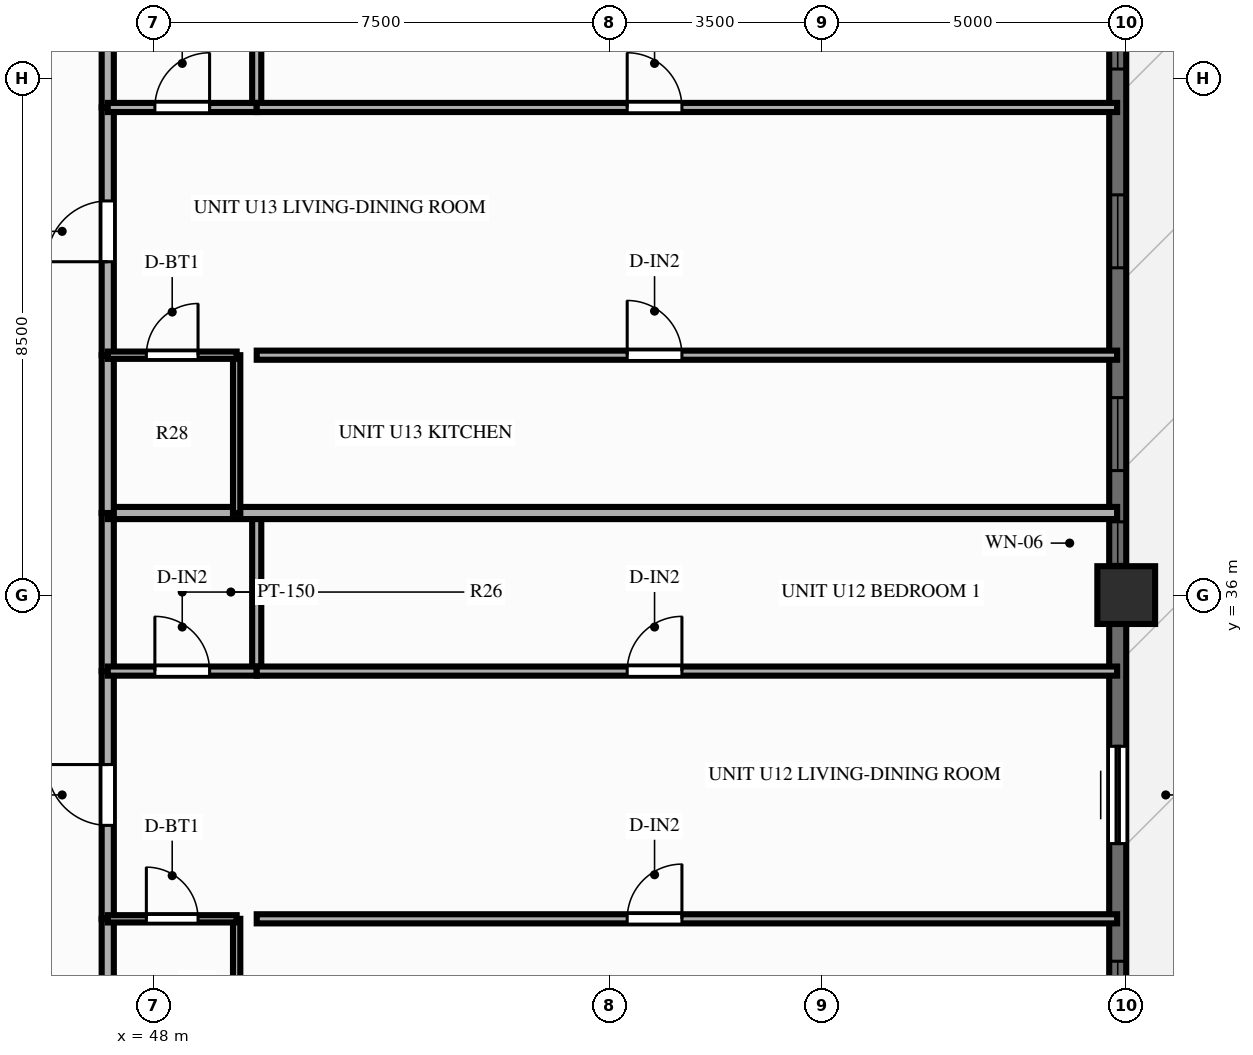
"""IFC4 building model, lengths in metres.
Left out: names, types, materials, properties, quantities, classifications, styles, units other than length and angle.
Written with IfcOpenShell. Run it as: python <this file> out.ifc"""

import sys

from ifc_helpers import new_model, si_unit, direction, frame, frame_2d, origin, origin_2d, place, context, subcontext, project, spatial, rectangle, extrude, source, transform, mapped, element, fill, save


model = new_model("IFC4")
c1 = context("Model", 3, precision=1e-05, world=origin(), true_north=direction((0.0, 1.0)))
c2 = subcontext(c1, "Body", "Model", "MODEL_VIEW")
j1 = project(units=[si_unit("LENGTHUNIT", "METRE"), si_unit("PLANEANGLEUNIT", "RADIAN")], contexts=[c1])
p1 = place(None, origin())
s1 = spatial("IfcSite", under=j1, at=p1, CompositionType="ELEMENT")
p2 = place(p1, origin())
s2 = spatial("IfcBuilding", under=s1, at=p2, CompositionType="ELEMENT")
p3 = place(p2, frame((0.0, 0.0, 110.85)))
s3 = spatial("IfcBuildingStorey", under=s2, at=p3, CompositionType="ELEMENT", Elevation=110.85)
m1 = source(origin(), c2, "Body", "SweptSolid", [
    extrude(rectangle(XDim=0.95, YDim=0.95, at=origin_2d()), origin(), (0.0, 0.0, 1.0), 3.0),
])
p4 = place(p3, frame((64.0, 36.0, 0.0), z_axis=(0.0, 0.0, 1.0), x_axis=(1.0, 0.0, 0.0)))
e1 = element("IfcColumn", 1, at=p4, inside=s3, PredefinedType="COLUMN", context=c2, shape_type="MappedRepresentation", body=[
    mapped(m1, transform((0.0, 0.0, 0.0), scale=1.0)),
])
p5 = place(p3, frame((63.86, 7.2, 0.0), z_axis=(0.0, 0.0, 1.0), x_axis=(0.0, 1.0, 0.0)))
e2 = element("IfcWall", 2, at=p5, inside=s3, PredefinedType="SOLIDWALL", context=c2, shape_type="SweptSolid", body=[
    extrude(rectangle(XDim=39.6, YDim=0.28, at=frame_2d((19.8, 0.0))), origin(), (0.0, 0.0, 1.0), 2.28),
])
p6 = place(p5, frame((0.945, 0.0, 0.25)))
e3 = element("IfcOpeningElement", 3, at=p6, cuts=e2, PredefinedType="OPENING", context=c2, shape_type="SweptSolid", body=[
    extrude(rectangle(XDim=1.2, YDim=1.5, at=frame_2d((0.6, 0.75))), frame((0.0, 0.152, 0.0), z_axis=(0.0, -1.0, 0.0), x_axis=(1.0, 0.0, 0.0)), (0.0, 0.0, 1.0), 0.304),
])
p7 = place(p5, frame((4.213, 0.0, 0.25)))
e4 = element("IfcOpeningElement", 4, at=p7, cuts=e2, PredefinedType="OPENING", context=c2, shape_type="SweptSolid", body=[
    extrude(rectangle(XDim=1.2, YDim=1.5, at=frame_2d((0.6, 0.75))), frame((0.0, 0.152, 0.0), z_axis=(0.0, -1.0, 0.0), x_axis=(1.0, 0.0, 0.0)), (0.0, 0.0, 1.0), 0.304),
])
p8 = place(p5, frame((7.55, 0.0, 0.25)))
e5 = element("IfcOpeningElement", 5, at=p8, cuts=e2, PredefinedType="OPENING", context=c2, shape_type="SweptSolid", body=[
    extrude(rectangle(XDim=1.2, YDim=1.5, at=frame_2d((0.6, 0.75))), frame((0.0, 0.152, 0.0), z_axis=(0.0, -1.0, 0.0), x_axis=(1.0, 0.0, 0.0)), (0.0, 0.0, 1.0), 0.304),
])
p9 = place(p5, frame((13.483, 0.0, 0.25)))
e6 = element("IfcOpeningElement", 6, at=p9, cuts=e2, PredefinedType="OPENING", context=c2, shape_type="SweptSolid", body=[
    extrude(rectangle(XDim=1.2, YDim=1.5, at=frame_2d((0.6, 0.75))), frame((0.0, 0.152, 0.0), z_axis=(0.0, -1.0, 0.0), x_axis=(1.0, 0.0, 0.0)), (0.0, 0.0, 1.0), 0.304),
])
p10 = place(p5, frame((16.82, 0.0, 0.25)))
e7 = element("IfcOpeningElement", 7, at=p10, cuts=e2, PredefinedType="OPENING", context=c2, shape_type="SweptSolid", body=[
    extrude(rectangle(XDim=1.2, YDim=1.5, at=frame_2d((0.6, 0.75))), frame((0.0, 0.152, 0.0), z_axis=(0.0, -1.0, 0.0), x_axis=(1.0, 0.0, 0.0)), (0.0, 0.0, 1.0), 0.304),
])
p11 = place(p5, frame((19.2, 0.0, 0.25)))
e8 = element("IfcOpeningElement", 8, at=p11, cuts=e2, PredefinedType="OPENING", context=c2, shape_type="SweptSolid", body=[
    extrude(rectangle(XDim=1.2, YDim=1.5, at=frame_2d((0.6, 0.75))), frame((0.0, 0.152, 0.0), z_axis=(0.0, -1.0, 0.0), x_axis=(1.0, 0.0, 0.0)), (0.0, 0.0, 1.0), 0.304),
])
p12 = place(p5, frame((21.578, 0.0, 0.25)))
e9 = element("IfcOpeningElement", 9, at=p12, cuts=e2, PredefinedType="OPENING", context=c2, shape_type="SweptSolid", body=[
    extrude(rectangle(XDim=1.2, YDim=1.5, at=frame_2d((0.6, 0.75))), frame((0.0, 0.152, 0.0), z_axis=(0.0, -1.0, 0.0), x_axis=(1.0, 0.0, 0.0)), (0.0, 0.0, 1.0), 0.304),
])
p13 = place(p5, frame((26.313, 0.0, 0.0), z_axis=(0.0, 0.0, 1.0), x_axis=(-1.0, 0.0, 0.0)))
e10 = element("IfcOpeningElement", 10, at=p13, cuts=e2, PredefinedType="OPENING", context=c2, shape_type="SweptSolid", body=[
    extrude(rectangle(XDim=1.6, YDim=2.15, at=frame_2d((0.8, 1.075))), frame((0.0, 0.152, 0.0), z_axis=(0.0, -1.0, 0.0), x_axis=(1.0, 0.0, 0.0)), (0.0, 0.0, 1.0), 0.304),
])
p14 = place(p5, frame((29.305, 0.0, 0.25)))
e11 = element("IfcOpeningElement", 11, at=p14, cuts=e2, PredefinedType="OPENING", context=c2, shape_type="SweptSolid", body=[
    extrude(rectangle(XDim=0.7, YDim=1.5, at=frame_2d((0.35, 0.75))), frame((0.0, 0.152, 0.0), z_axis=(0.0, -1.0, 0.0), x_axis=(1.0, 0.0, 0.0)), (0.0, 0.0, 1.0), 0.304),
])
p15 = place(p5, frame((30.848, 0.0, 0.25)))
e12 = element("IfcOpeningElement", 12, at=p15, cuts=e2, PredefinedType="OPENING", context=c2, shape_type="SweptSolid", body=[
    extrude(rectangle(XDim=1.2, YDim=1.5, at=frame_2d((0.6, 0.75))), frame((0.0, 0.152, 0.0), z_axis=(0.0, -1.0, 0.0), x_axis=(1.0, 0.0, 0.0)), (0.0, 0.0, 1.0), 0.304),
])
p16 = place(p5, frame((34.183, 0.0, 0.25)))
e13 = element("IfcOpeningElement", 13, at=p16, cuts=e2, PredefinedType="OPENING", context=c2, shape_type="SweptSolid", body=[
    extrude(rectangle(XDim=1.2, YDim=1.5, at=frame_2d((0.6, 0.75))), frame((0.0, 0.152, 0.0), z_axis=(0.0, -1.0, 0.0), x_axis=(1.0, 0.0, 0.0)), (0.0, 0.0, 1.0), 0.304),
])
p17 = place(p5, frame((37.452, 0.0, 0.25)))
e14 = element("IfcOpeningElement", 14, at=p17, cuts=e2, PredefinedType="OPENING", context=c2, shape_type="SweptSolid", body=[
    extrude(rectangle(XDim=1.2, YDim=1.5, at=frame_2d((0.6, 0.75))), frame((0.0, 0.152, 0.0), z_axis=(0.0, -1.0, 0.0), x_axis=(1.0, 0.0, 0.0)), (0.0, 0.0, 1.0), 0.304),
])
p18 = place(p3, frame((47.25, 28.08, 0.0), z_axis=(0.0, 0.0, 1.0), x_axis=(0.0, 1.0, 0.0)))
e15 = element("IfcWall", 15, at=p18, inside=s3, PredefinedType="PARTITIONING", context=c2, shape_type="SweptSolid", body=[
    extrude(rectangle(XDim=2.595, YDim=0.2, at=frame_2d((1.298, 0.0))), origin(), (0.0, 0.0, 1.0), 2.79),
])
p19 = place(p3, frame((47.25, 30.676, 0.0), z_axis=(0.0, 0.0, 1.0), x_axis=(0.0, 1.0, 0.0)))
e16 = element("IfcWall", 16, at=p19, inside=s3, PredefinedType="PARTITIONING", context=c2, shape_type="SweptSolid", body=[
    extrude(rectangle(XDim=4.074, YDim=0.2, at=frame_2d((2.037, 0.0))), origin(), (0.0, 0.0, 1.0), 2.79),
])
p20 = place(p19, frame((1.537, 0.0, 0.0)))
e17 = element("IfcOpeningElement", 17, at=p20, cuts=e16, PredefinedType="OPENING", context=c2, shape_type="SweptSolid", body=[
    extrude(rectangle(XDim=1.0, YDim=2.15, at=frame_2d((0.5, 1.075))), frame((0.0, 0.112, 0.0), z_axis=(0.0, -1.0, 0.0), x_axis=(1.0, 0.0, 0.0)), (0.0, 0.0, 1.0), 0.224),
])
p21 = place(p3, frame((47.25, 34.75, 0.0), z_axis=(0.0, 0.0, 1.0), x_axis=(0.0, 1.0, 0.0)))
e18 = element("IfcWall", 18, at=p21, inside=s3, PredefinedType="PARTITIONING", context=c2, shape_type="SweptSolid", body=[
    extrude(rectangle(XDim=2.6, YDim=0.2, at=frame_2d((1.3, 0.0))), origin(), (0.0, 0.0, 1.0), 2.79),
])
p22 = place(p3, frame((49.37, 28.08, 0.0), z_axis=(0.0, 0.0, 1.0), x_axis=(0.0, 1.0, 0.0)))
e19 = element("IfcWall", 19, at=p22, inside=s3, PredefinedType="PARTITIONING", context=c2, shape_type="SweptSolid", body=[
    extrude(rectangle(XDim=2.595, YDim=0.12, at=frame_2d((1.298, 0.0))), origin(), (0.0, 0.0, 1.0), 2.79),
])
p23 = place(p3, frame((49.7, 34.75, 0.0), z_axis=(0.0, 0.0, 1.0), x_axis=(0.0, 1.0, 0.0)))
e20 = element("IfcWall", 20, at=p23, inside=s3, PredefinedType="PARTITIONING", context=c2, shape_type="SweptSolid", body=[
    extrude(rectangle(XDim=2.6, YDim=0.15, at=frame_2d((1.3, 0.0))), origin(), (0.0, 0.0, 1.0), 2.79),
])
p24 = place(p3, frame((47.25, 30.676, 0.0), z_axis=(0.0, 0.0, 1.0), x_axis=(1.0, 0.0, 0.0)))
e21 = element("IfcWall", 21, at=p24, inside=s3, PredefinedType="PARTITIONING", context=c2, shape_type="SweptSolid", body=[
    extrude(rectangle(XDim=2.12, YDim=0.12, at=frame_2d((1.06, 0.0))), origin(), (0.0, 0.0, 1.0), 2.79),
])
p25 = place(p24, frame((0.635, 0.0, 0.0)))
e22 = element("IfcOpeningElement", 22, at=p25, cuts=e21, PredefinedType="OPENING", context=c2, shape_type="SweptSolid", body=[
    extrude(rectangle(XDim=0.85, YDim=2.05, at=frame_2d((0.425, 1.025))), frame((0.0, 0.072, 0.0), z_axis=(0.0, -1.0, 0.0), x_axis=(1.0, 0.0, 0.0)), (0.0, 0.0, 1.0), 0.144),
])
p26 = place(p3, frame((49.7, 30.676, 0.0), z_axis=(0.0, 0.0, 1.0), x_axis=(1.0, 0.0, 0.0)))
e23 = element("IfcWall", 23, at=p26, inside=s3, PredefinedType="PARTITIONING", context=c2, shape_type="SweptSolid", body=[
    extrude(rectangle(XDim=14.15, YDim=0.15, at=frame_2d((7.075, 0.0))), origin(), (0.0, 0.0, 1.0), 2.79),
])
p27 = place(p26, frame((6.093, 0.0, 0.0)))
e24 = element("IfcOpeningElement", 24, at=p27, cuts=e23, PredefinedType="OPENING", context=c2, shape_type="SweptSolid", body=[
    extrude(rectangle(XDim=0.9, YDim=2.1, at=frame_2d((0.45, 1.05))), frame((0.0, 0.087, 0.0), z_axis=(0.0, -1.0, 0.0), x_axis=(1.0, 0.0, 0.0)), (0.0, 0.0, 1.0), 0.174),
])
p28 = place(p3, frame((47.25, 34.75, 0.0), z_axis=(0.0, 0.0, 1.0), x_axis=(1.0, 0.0, 0.0)))
e25 = element("IfcWall", 25, at=p28, inside=s3, PredefinedType="PARTITIONING", context=c2, shape_type="SweptSolid", body=[
    extrude(rectangle(XDim=2.45, YDim=0.15, at=frame_2d((1.225, 0.0))), origin(), (0.0, 0.0, 1.0), 2.79),
])
p29 = place(p28, frame((0.775, 0.0, 0.0)))
e26 = element("IfcOpeningElement", 26, at=p29, cuts=e25, PredefinedType="OPENING", context=c2, shape_type="SweptSolid", body=[
    extrude(rectangle(XDim=0.9, YDim=2.1, at=frame_2d((0.45, 1.05))), frame((0.0, 0.087, 0.0), z_axis=(0.0, -1.0, 0.0), x_axis=(1.0, 0.0, 0.0)), (0.0, 0.0, 1.0), 0.174),
])
p30 = place(p3, frame((49.7, 34.75, 0.0), z_axis=(0.0, 0.0, 1.0), x_axis=(1.0, 0.0, 0.0)))
e27 = element("IfcWall", 27, at=p30, inside=s3, PredefinedType="PARTITIONING", context=c2, shape_type="SweptSolid", body=[
    extrude(rectangle(XDim=14.15, YDim=0.15, at=frame_2d((7.075, 0.0))), origin(), (0.0, 0.0, 1.0), 2.79),
])
p31 = place(p30, frame((6.093, 0.0, 0.0)))
e28 = element("IfcOpeningElement", 28, at=p31, cuts=e27, PredefinedType="OPENING", context=c2, shape_type="SweptSolid", body=[
    extrude(rectangle(XDim=0.9, YDim=2.1, at=frame_2d((0.45, 1.05))), frame((0.0, 0.087, 0.0), z_axis=(0.0, -1.0, 0.0), x_axis=(1.0, 0.0, 0.0)), (0.0, 0.0, 1.0), 0.174),
])
p32 = place(p3, frame((47.25, 37.35, 0.0), z_axis=(0.0, 0.0, 1.0), x_axis=(1.0, 0.0, 0.0)))
e29 = element("IfcWall", 29, at=p32, inside=s3, PredefinedType="PARTITIONING", context=c2, shape_type="SweptSolid", body=[
    extrude(rectangle(XDim=16.6, YDim=0.2, at=frame_2d((8.3, 0.0))), origin(), (0.0, 0.0, 1.0), 2.79),
])
p33 = place(p3, frame((47.25, 37.35, 0.0), z_axis=(0.0, 0.0, 1.0), x_axis=(0.0, 1.0, 0.0)))
e30 = element("IfcWall", 30, at=p33, inside=s3, PredefinedType="PARTITIONING", context=c2, shape_type="SweptSolid", body=[
    extrude(rectangle(XDim=2.595, YDim=0.2, at=frame_2d((1.298, 0.0))), origin(), (0.0, 0.0, 1.0), 2.79),
])
p34 = place(p3, frame((47.25, 39.946, 0.0), z_axis=(0.0, 0.0, 1.0), x_axis=(0.0, 1.0, 0.0)))
e31 = element("IfcWall", 31, at=p34, inside=s3, PredefinedType="PARTITIONING", context=c2, shape_type="SweptSolid", body=[
    extrude(rectangle(XDim=4.074, YDim=0.2, at=frame_2d((2.037, 0.0))), origin(), (0.0, 0.0, 1.0), 2.79),
])
p35 = place(p34, frame((1.537, 0.0, 0.0)))
e32 = element("IfcOpeningElement", 32, at=p35, cuts=e31, PredefinedType="OPENING", context=c2, shape_type="SweptSolid", body=[
    extrude(rectangle(XDim=1.0, YDim=2.15, at=frame_2d((0.5, 1.075))), frame((0.0, 0.112, 0.0), z_axis=(0.0, -1.0, 0.0), x_axis=(1.0, 0.0, 0.0)), (0.0, 0.0, 1.0), 0.224),
])
p36 = place(p3, frame((47.25, 44.02, 0.0), z_axis=(0.0, 0.0, 1.0), x_axis=(0.0, 1.0, 0.0)))
e33 = element("IfcWall", 33, at=p36, inside=s3, PredefinedType="PARTITIONING", context=c2, shape_type="SweptSolid", body=[
    extrude(rectangle(XDim=2.6, YDim=0.2, at=frame_2d((1.3, 0.0))), origin(), (0.0, 0.0, 1.0), 2.79),
])
p37 = place(p3, frame((49.37, 37.35, 0.0), z_axis=(0.0, 0.0, 1.0), x_axis=(0.0, 1.0, 0.0)))
e34 = element("IfcWall", 34, at=p37, inside=s3, PredefinedType="PARTITIONING", context=c2, shape_type="SweptSolid", body=[
    extrude(rectangle(XDim=2.595, YDim=0.12, at=frame_2d((1.298, 0.0))), origin(), (0.0, 0.0, 1.0), 2.79),
])
p38 = place(p3, frame((49.7, 44.02, 0.0), z_axis=(0.0, 0.0, 1.0), x_axis=(0.0, 1.0, 0.0)))
e35 = element("IfcWall", 35, at=p38, inside=s3, PredefinedType="PARTITIONING", context=c2, shape_type="SweptSolid", body=[
    extrude(rectangle(XDim=2.6, YDim=0.15, at=frame_2d((1.3, 0.0))), origin(), (0.0, 0.0, 1.0), 2.79),
])
p39 = place(p3, frame((47.25, 39.946, 0.0), z_axis=(0.0, 0.0, 1.0), x_axis=(1.0, 0.0, 0.0)))
e36 = element("IfcWall", 36, at=p39, inside=s3, PredefinedType="PARTITIONING", context=c2, shape_type="SweptSolid", body=[
    extrude(rectangle(XDim=2.12, YDim=0.12, at=frame_2d((1.06, 0.0))), origin(), (0.0, 0.0, 1.0), 2.79),
])
p40 = place(p39, frame((0.635, 0.0, 0.0)))
e37 = element("IfcOpeningElement", 37, at=p40, cuts=e36, PredefinedType="OPENING", context=c2, shape_type="SweptSolid", body=[
    extrude(rectangle(XDim=0.85, YDim=2.05, at=frame_2d((0.425, 1.025))), frame((0.0, 0.072, 0.0), z_axis=(0.0, -1.0, 0.0), x_axis=(1.0, 0.0, 0.0)), (0.0, 0.0, 1.0), 0.144),
])
p41 = place(p3, frame((49.7, 39.946, 0.0), z_axis=(0.0, 0.0, 1.0), x_axis=(1.0, 0.0, 0.0)))
e38 = element("IfcWall", 38, at=p41, inside=s3, PredefinedType="PARTITIONING", context=c2, shape_type="SweptSolid", body=[
    extrude(rectangle(XDim=14.15, YDim=0.15, at=frame_2d((7.075, 0.0))), origin(), (0.0, 0.0, 1.0), 2.79),
])
p42 = place(p41, frame((6.093, 0.0, 0.0)))
e39 = element("IfcOpeningElement", 39, at=p42, cuts=e38, PredefinedType="OPENING", context=c2, shape_type="SweptSolid", body=[
    extrude(rectangle(XDim=0.9, YDim=2.1, at=frame_2d((0.45, 1.05))), frame((0.0, 0.087, 0.0), z_axis=(0.0, -1.0, 0.0), x_axis=(1.0, 0.0, 0.0)), (0.0, 0.0, 1.0), 0.174),
])
p43 = place(p3, frame((47.25, 44.02, 0.0), z_axis=(0.0, 0.0, 1.0), x_axis=(1.0, 0.0, 0.0)))
e40 = element("IfcWall", 40, at=p43, inside=s3, PredefinedType="PARTITIONING", context=c2, shape_type="SweptSolid", body=[
    extrude(rectangle(XDim=2.45, YDim=0.15, at=frame_2d((1.225, 0.0))), origin(), (0.0, 0.0, 1.0), 2.79),
])
p44 = place(p43, frame((0.775, 0.0, 0.0)))
e41 = element("IfcOpeningElement", 41, at=p44, cuts=e40, PredefinedType="OPENING", context=c2, shape_type="SweptSolid", body=[
    extrude(rectangle(XDim=0.9, YDim=2.1, at=frame_2d((0.45, 1.05))), frame((0.0, 0.087, 0.0), z_axis=(0.0, -1.0, 0.0), x_axis=(1.0, 0.0, 0.0)), (0.0, 0.0, 1.0), 0.174),
])
p45 = place(p3, frame((49.7, 44.02, 0.0), z_axis=(0.0, 0.0, 1.0), x_axis=(1.0, 0.0, 0.0)))
e42 = element("IfcWall", 42, at=p45, inside=s3, PredefinedType="PARTITIONING", context=c2, shape_type="SweptSolid", body=[
    extrude(rectangle(XDim=14.15, YDim=0.15, at=frame_2d((7.075, 0.0))), origin(), (0.0, 0.0, 1.0), 2.79),
])
p46 = place(p45, frame((6.093, 0.0, 0.0)))
e43 = element("IfcOpeningElement", 43, at=p46, cuts=e42, PredefinedType="OPENING", context=c2, shape_type="SweptSolid", body=[
    extrude(rectangle(XDim=0.9, YDim=2.1, at=frame_2d((0.45, 1.05))), frame((0.0, 0.087, 0.0), z_axis=(0.0, -1.0, 0.0), x_axis=(1.0, 0.0, 0.0)), (0.0, 0.0, 1.0), 0.174),
])
m2 = source(origin(), c2, "Body", "SweptSolid", [
    extrude(rectangle(XDim=1.2, YDim=1.5, at=frame_2d((0.6, 0.75))), frame((0.0, 0.03, 0.0), z_axis=(0.0, -1.0, 0.0), x_axis=(1.0, 0.0, 0.0)), (0.0, 0.0, 1.0), 0.06),
])
p47 = place(p12, origin())
e44 = element("IfcWindow", 44, at=p47, inside=s3, PartitioningType="SINGLE_PANEL", PredefinedType="WINDOW", context=c2, shape_type="MappedRepresentation", body=[
    mapped(m2, transform((0.0, 0.0, 0.0), scale=1.0)),
])
fill(e9, e44)
m3 = source(origin(), c2, "Body", "SweptSolid", [
    extrude(rectangle(XDim=1.6, YDim=2.15, at=frame_2d((0.8, 1.075))), frame((0.0, 0.025, 0.0), z_axis=(0.0, -1.0, 0.0), x_axis=(1.0, 0.0, 0.0)), (0.0, 0.0, 1.0), 0.05),
])
p48 = place(p13, origin())
e45 = element("IfcDoor", 45, at=p48, inside=s3, OperationType="SLIDING_TO_LEFT", PredefinedType="DOOR", context=c2, shape_type="MappedRepresentation", body=[
    mapped(m3, transform((0.0, 0.0, 0.0), scale=1.0)),
])
fill(e10, e45)
m4 = source(origin(), c2, "Body", "SweptSolid", [
    extrude(rectangle(XDim=0.7, YDim=1.5, at=frame_2d((0.35, 0.75))), frame((0.0, 0.03, 0.0), z_axis=(0.0, -1.0, 0.0), x_axis=(1.0, 0.0, 0.0)), (0.0, 0.0, 1.0), 0.06),
])
p49 = place(p14, origin())
e46 = element("IfcWindow", 46, at=p49, inside=s3, PartitioningType="SINGLE_PANEL", PredefinedType="WINDOW", context=c2, shape_type="MappedRepresentation", body=[
    mapped(m4, transform((0.0, 0.0, 0.0), scale=1.0)),
])
fill(e11, e46)
p50 = place(p15, origin())
e47 = element("IfcWindow", 47, at=p50, inside=s3, PartitioningType="SINGLE_PANEL", PredefinedType="WINDOW", context=c2, shape_type="MappedRepresentation", body=[
    mapped(m2, transform((0.0, 0.0, 0.0), scale=1.0)),
])
fill(e12, e47)
p51 = place(p16, origin())
e48 = element("IfcWindow", 48, at=p51, inside=s3, PartitioningType="SINGLE_PANEL", PredefinedType="WINDOW", context=c2, shape_type="MappedRepresentation", body=[
    mapped(m2, transform((0.0, 0.0, 0.0), scale=1.0)),
])
fill(e13, e48)
p52 = place(p17, origin())
e49 = element("IfcWindow", 49, at=p52, inside=s3, PartitioningType="SINGLE_PANEL", PredefinedType="WINDOW", context=c2, shape_type="MappedRepresentation", body=[
    mapped(m2, transform((0.0, 0.0, 0.0), scale=1.0)),
])
fill(e14, e49)
m5 = source(origin(), c2, "Body", "SweptSolid", [
    extrude(rectangle(XDim=1.0, YDim=2.15, at=frame_2d((0.5, 1.075))), frame((0.0, 0.025, 0.0), z_axis=(0.0, -1.0, 0.0), x_axis=(1.0, 0.0, 0.0)), (0.0, 0.0, 1.0), 0.05),
])
p53 = place(p20, origin())
e50 = element("IfcDoor", 50, at=p53, inside=s3, OperationType="SINGLE_SWING_RIGHT", PredefinedType="DOOR", context=c2, shape_type="MappedRepresentation", body=[
    mapped(m5, transform((0.0, 0.0, 0.0), scale=1.0)),
])
fill(e17, e50)
m6 = source(origin(), c2, "Body", "SweptSolid", [
    extrude(rectangle(XDim=0.85, YDim=2.05, at=frame_2d((0.425, 1.025))), frame((0.0, 0.025, 0.0), z_axis=(0.0, -1.0, 0.0), x_axis=(1.0, 0.0, 0.0)), (0.0, 0.0, 1.0), 0.05),
])
p54 = place(p25, origin())
e51 = element("IfcDoor", 51, at=p54, inside=s3, OperationType="SINGLE_SWING_LEFT", PredefinedType="DOOR", context=c2, shape_type="MappedRepresentation", body=[
    mapped(m6, transform((0.0, 0.0, 0.0), scale=1.0)),
])
fill(e22, e51)
m7 = source(origin(), c2, "Body", "SweptSolid", [
    extrude(rectangle(XDim=0.9, YDim=2.1, at=frame_2d((0.45, 1.05))), frame((0.0, 0.025, 0.0), z_axis=(0.0, -1.0, 0.0), x_axis=(1.0, 0.0, 0.0)), (0.0, 0.0, 1.0), 0.05),
])
p55 = place(p27, origin())
e52 = element("IfcDoor", 52, at=p55, inside=s3, OperationType="SINGLE_SWING_RIGHT", PredefinedType="DOOR", context=c2, shape_type="MappedRepresentation", body=[
    mapped(m7, transform((0.0, 0.0, 0.0), scale=1.0)),
])
fill(e24, e52)
p56 = place(p29, origin())
e53 = element("IfcDoor", 53, at=p56, inside=s3, OperationType="SINGLE_SWING_LEFT", PredefinedType="DOOR", context=c2, shape_type="MappedRepresentation", body=[
    mapped(m7, transform((0.0, 0.0, 0.0), scale=1.0)),
])
fill(e26, e53)
p57 = place(p31, origin())
e54 = element("IfcDoor", 54, at=p57, inside=s3, OperationType="SINGLE_SWING_RIGHT", PredefinedType="DOOR", context=c2, shape_type="MappedRepresentation", body=[
    mapped(m7, transform((0.0, 0.0, 0.0), scale=1.0)),
])
fill(e28, e54)
p58 = place(p35, origin())
e55 = element("IfcDoor", 55, at=p58, inside=s3, OperationType="SINGLE_SWING_LEFT", PredefinedType="DOOR", context=c2, shape_type="MappedRepresentation", body=[
    mapped(m5, transform((0.0, 0.0, 0.0), scale=1.0)),
])
fill(e32, e55)
p59 = place(p40, origin())
e56 = element("IfcDoor", 56, at=p59, inside=s3, OperationType="SINGLE_SWING_RIGHT", PredefinedType="DOOR", context=c2, shape_type="MappedRepresentation", body=[
    mapped(m6, transform((0.0, 0.0, 0.0), scale=1.0)),
])
fill(e37, e56)
p60 = place(p42, origin())
e57 = element("IfcDoor", 57, at=p60, inside=s3, OperationType="SINGLE_SWING_LEFT", PredefinedType="DOOR", context=c2, shape_type="MappedRepresentation", body=[
    mapped(m7, transform((0.0, 0.0, 0.0), scale=1.0)),
])
fill(e39, e57)
p61 = place(p44, origin())
e58 = element("IfcDoor", 58, at=p61, inside=s3, OperationType="SINGLE_SWING_RIGHT", PredefinedType="DOOR", context=c2, shape_type="MappedRepresentation", body=[
    mapped(m7, transform((0.0, 0.0, 0.0), scale=1.0)),
])
fill(e41, e58)
p62 = place(p46, origin())
e59 = element("IfcDoor", 59, at=p62, inside=s3, OperationType="SINGLE_SWING_LEFT", PredefinedType="DOOR", context=c2, shape_type="MappedRepresentation", body=[
    mapped(m7, transform((0.0, 0.0, 0.0), scale=1.0)),
])
fill(e43, e59)
save(model, sys.argv[1])
